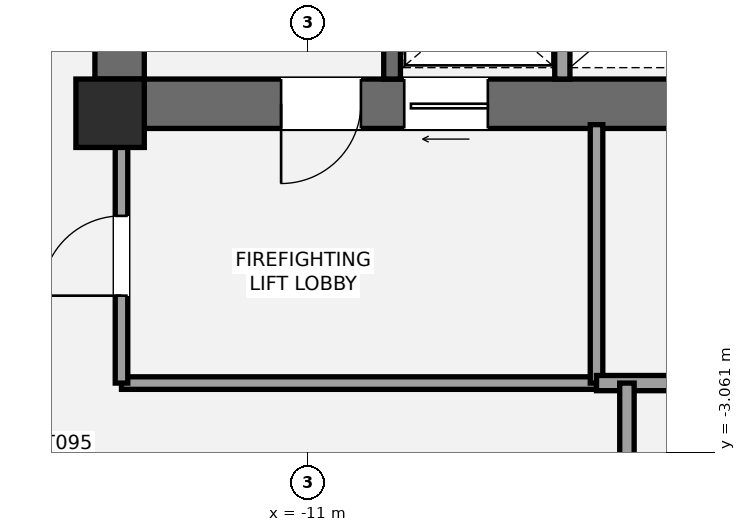
"""IFC4 building model, lengths in metres.
Left out: names, types, materials, properties, quantities, classifications, styles, units other than length and angle.
Written with IfcOpenShell. Run it as: python <this file> out.ifc"""

import sys

from ifc_helpers import new_model, si_unit, direction, frame, frame_2d, origin, origin_2d, place, context, subcontext, project, spatial, rectangle, extrude, element, fill, save


model = new_model("IFC4")
c1 = context("Model", 3, precision=1e-05, world=origin(), true_north=direction((0.0, 1.0)))
c2 = subcontext(c1, "Body", "Model", "MODEL_VIEW")
j1 = project(units=[si_unit("LENGTHUNIT", "METRE"), si_unit("PLANEANGLEUNIT", "RADIAN")], contexts=[c1])
p1 = place(None, origin())
s1 = spatial("IfcSite", under=j1, at=p1, CompositionType="ELEMENT")
p2 = place(p1, origin())
s2 = spatial("IfcBuilding", under=s1, at=p2, CompositionType="ELEMENT")
p3 = place(p2, frame((0.0, 0.0, 143.8)))
s3 = spatial("IfcBuildingStorey", under=s2, at=p3, CompositionType="ELEMENT", Elevation=143.8)
p4 = place(p3, frame((-13.475, 1.2, 0.0), z_axis=(0.0, 0.0, 1.0), x_axis=(0.0, 1.0, 0.0)))
e1 = element("IfcWall", 1, at=p4, inside=s3, PredefinedType="SHEAR", context=c2, shape_type="SweptSolid", body=[
    extrude(rectangle(XDim=8.45, YDim=0.65, at=frame_2d((4.225, 0.0))), origin(), (0.0, 0.0, 1.0), 3.2),
])
p5 = place(p3, frame((-4.875, 1.525, 0.0), z_axis=(0.0, 0.0, 1.0), x_axis=(-1.0, 0.0, 0.0)))
e2 = element("IfcWall", 2, at=p5, inside=s3, PredefinedType="SHEAR", context=c2, shape_type="SweptSolid", body=[
    extrude(rectangle(XDim=8.925, YDim=0.65, at=frame_2d((4.462, 0.0))), origin(), (0.0, 0.0, 1.0), 3.2),
])
p6 = place(p5, frame((5.425, 0.0, 0.0)))
e3 = element("IfcOpeningElement", 3, at=p6, cuts=e2, PredefinedType="OPENING", context=c2, shape_type="SweptSolid", body=[
    extrude(rectangle(XDim=1.05, YDim=2.15, at=frame_2d((0.525, 1.075))), frame((0.0, 0.335, 0.0), z_axis=(0.0, -1.0, 0.0), x_axis=(1.0, 0.0, 0.0)), (0.0, 0.0, 1.0), 0.67),
])
p7 = place(p5, frame((3.755, 0.0, 0.0)))
e4 = element("IfcOpeningElement", 4, at=p7, cuts=e2, PredefinedType="OPENING", context=c2, shape_type="SweptSolid", body=[
    extrude(rectangle(XDim=1.1, YDim=2.2, at=frame_2d((0.55, 1.1))), frame((0.0, 0.335, 0.0), z_axis=(0.0, -1.0, 0.0), x_axis=(1.0, 0.0, 0.0)), (0.0, 0.0, 1.0), 0.67),
])
p8 = place(p3, frame((-9.89, 1.85, 0.0), z_axis=(0.0, 0.0, 1.0), x_axis=(0.0, 1.0, 0.0)))
e5 = element("IfcWall", 5, at=p8, inside=s3, PredefinedType="SHEAR", context=c2, shape_type="SweptSolid", body=[
    extrude(rectangle(XDim=7.15, YDim=0.22, at=frame_2d((3.575, 0.0))), origin(), (0.0, 0.0, 1.0), 3.2),
])
p9 = place(p3, frame((-13.6, 1.4, 0.0), z_axis=(0.0, 0.0, 1.0), x_axis=(1.0, 0.0, 0.0)))
e6 = element("IfcColumn", 6, at=p9, inside=s3, PredefinedType="COLUMN", context=c2, shape_type="SweptSolid", body=[
    extrude(rectangle(XDim=0.9, YDim=0.9, at=origin_2d()), origin(), (0.0, 0.0, 1.0), 3.2),
])
p10 = place(p3, frame((-13.45, -2.15, 0.0), z_axis=(0.0, 0.0, 1.0), x_axis=(1.0, 0.0, 0.0)))
e7 = element("IfcWall", 7, at=p10, inside=s3, PredefinedType="PARTITIONING", context=c2, shape_type="SweptSolid", body=[
    extrude(rectangle(XDim=6.25, YDim=0.165, at=frame_2d((3.125, 0.0))), origin(), (0.0, 0.0, 1.0), 2.473),
])
p11 = place(p3, frame((-13.45, -2.15, 0.0), z_axis=(0.0, 0.0, 1.0), x_axis=(0.0, 1.0, 0.0)))
e8 = element("IfcWall", 8, at=p11, inside=s3, PredefinedType="PARTITIONING", context=c2, shape_type="SweptSolid", body=[
    extrude(rectangle(XDim=3.4, YDim=0.165, at=frame_2d((1.7, 0.0))), origin(), (0.0, 0.0, 1.0), 2.473),
])
p12 = place(p11, frame((1.15, 0.0, 0.0)))
e9 = element("IfcOpeningElement", 9, at=p12, cuts=e8, PredefinedType="OPENING", context=c2, shape_type="SweptSolid", body=[
    extrude(rectangle(XDim=1.05, YDim=2.15, at=frame_2d((0.525, 1.075))), frame((0.0, 0.093, 0.0), z_axis=(0.0, -1.0, 0.0), x_axis=(1.0, 0.0, 0.0)), (0.0, 0.0, 1.0), 0.185),
])
p13 = place(p3, frame((-7.2, -2.15, 0.0), z_axis=(0.0, 0.0, 1.0), x_axis=(0.0, 1.0, 0.0)))
e10 = element("IfcWall", 10, at=p13, inside=s3, PredefinedType="PARTITIONING", context=c2, shape_type="SweptSolid", body=[
    extrude(rectangle(XDim=3.4, YDim=0.165, at=frame_2d((1.7, 0.0))), origin(), (0.0, 0.0, 1.0), 2.473),
])
p14 = place(p3, frame((-7.2, -2.15, 0.0), z_axis=(0.0, 0.0, 1.0), x_axis=(1.0, 0.0, 0.0)))
e11 = element("IfcWall", 11, at=p14, inside=s3, PredefinedType="SOLIDWALL", context=c2, shape_type="SweptSolid", body=[
    extrude(rectangle(XDim=2.25, YDim=0.2, at=frame_2d((1.125, 0.0))), origin(), (0.0, 0.0, 1.0), 3.02),
])
p15 = place(p3, frame((-7.65, 1.85, 0.0), z_axis=(0.0, 0.0, 1.0), x_axis=(0.0, 1.0, 0.0)))
e12 = element("IfcWall", 12, at=p15, inside=s3, PredefinedType="SOLIDWALL", context=c2, shape_type="SweptSolid", body=[
    extrude(rectangle(XDim=1.93, YDim=0.2, at=frame_2d((0.965, 0.0))), origin(), (0.0, 0.0, 1.0), 3.02),
])
p16 = place(p3, frame((-6.8, -4.05, 0.0), z_axis=(0.0, 0.0, 1.0), x_axis=(0.0, 1.0, 0.0)))
e13 = element("IfcWall", 13, at=p16, inside=s3, PredefinedType="PLUMBINGWALL", context=c2, shape_type="SweptSolid", body=[
    extrude(rectangle(XDim=1.9, YDim=0.19, at=frame_2d((0.95, 0.0))), origin(), (0.0, 0.0, 1.0), 2.473),
])
p17 = place(p6, origin())
e14 = element("IfcDoor", 14, at=p17, inside=s3, OperationType="SINGLE_SWING_RIGHT", PredefinedType="DOOR", context=c2, shape_type="SweptSolid", body=[
    extrude(rectangle(XDim=1.05, YDim=2.15, at=frame_2d((0.525, 1.075))), frame((0.0, 0.025, 0.0), z_axis=(0.0, -1.0, 0.0), x_axis=(1.0, 0.0, 0.0)), (0.0, 0.0, 1.0), 0.05),
])
fill(e3, e14)
p18 = place(p12, origin())
e15 = element("IfcDoor", 15, at=p18, inside=s3, OperationType="SINGLE_SWING_LEFT", PredefinedType="DOOR", context=c2, shape_type="SweptSolid", body=[
    extrude(rectangle(XDim=1.05, YDim=2.15, at=frame_2d((0.525, 1.075))), frame((0.0, 0.025, 0.0), z_axis=(0.0, -1.0, 0.0), x_axis=(1.0, 0.0, 0.0)), (0.0, 0.0, 1.0), 0.05),
])
fill(e9, e15)
p19 = place(p7, origin())
e16 = element("IfcDoor", 16, at=p19, inside=s3, OperationType="SLIDING_TO_LEFT", PredefinedType="DOOR", context=c2, shape_type="SweptSolid", body=[
    extrude(rectangle(XDim=1.1, YDim=2.2, at=frame_2d((0.55, 1.1))), frame((0.0, 0.025, 0.0), z_axis=(0.0, -1.0, 0.0), x_axis=(1.0, 0.0, 0.0)), (0.0, 0.0, 1.0), 0.05),
])
fill(e4, e16)
save(model, sys.argv[1])
